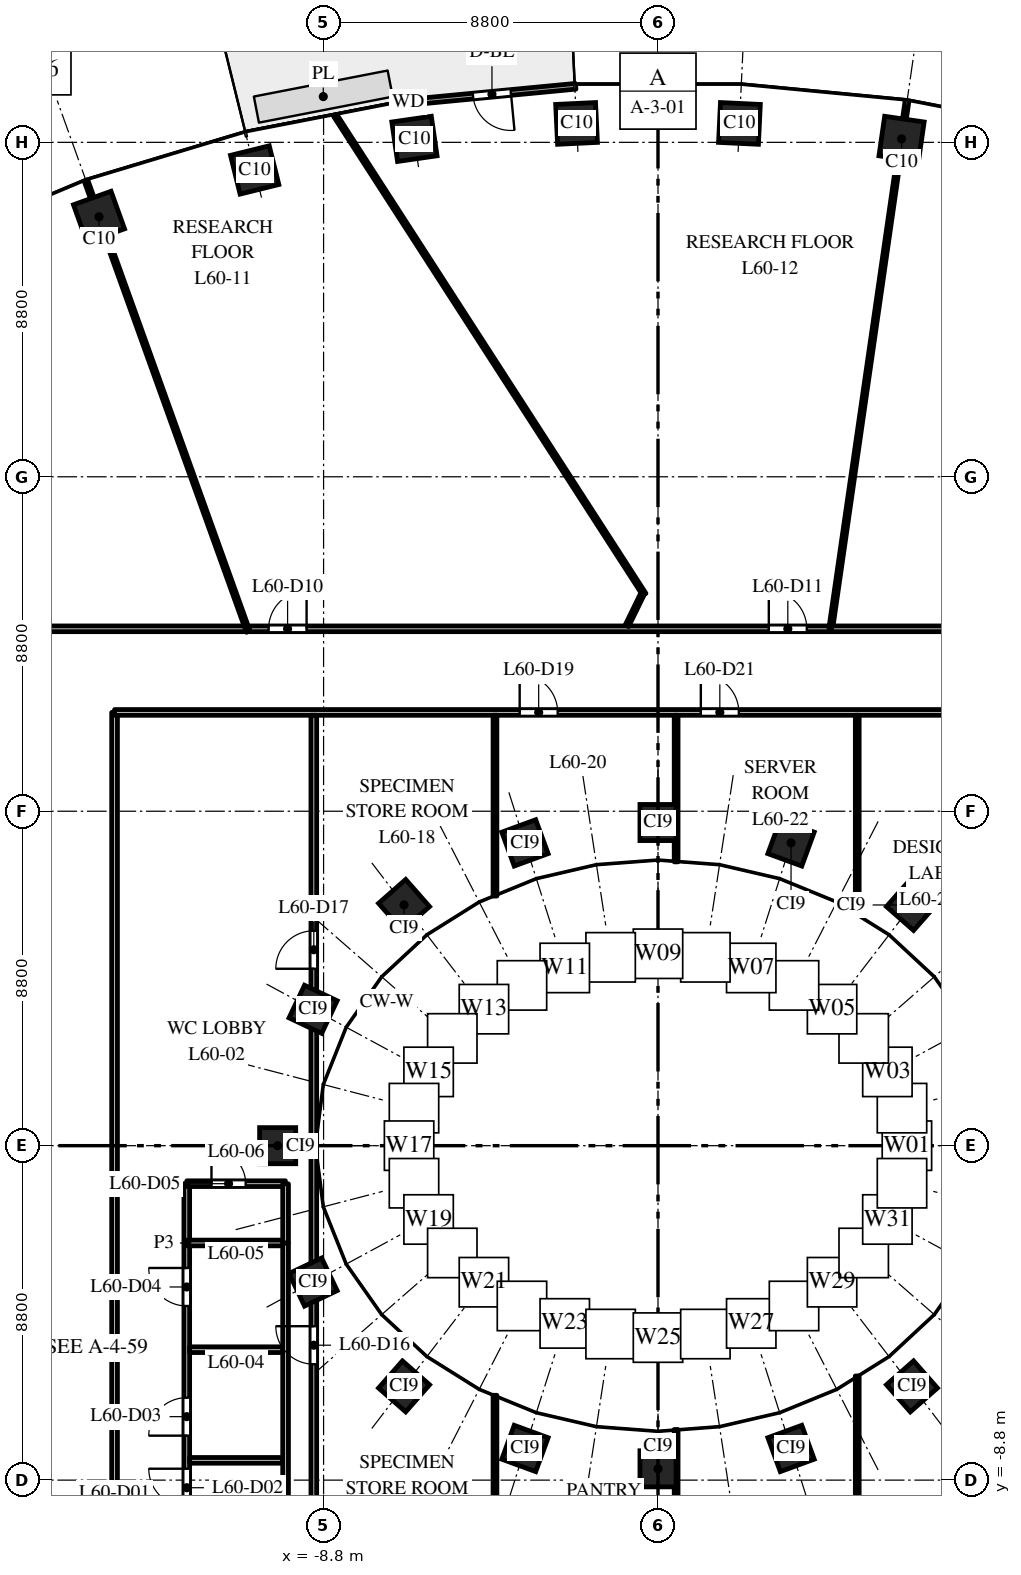
"""IFC4 building model, lengths in metres.
Left out: names, types, materials, properties, quantities, classifications, styles, units other than length and angle.
Written with IfcOpenShell. Run it as: python <this file> out.ifc"""

import sys

from ifc_helpers import new_model, si_unit, direction, frame, frame_2d, origin, origin_2d, place, context, subcontext, project, spatial, rectangle, extrude, element, fill, save


model = new_model("IFC4")
c1 = context("Model", 3, precision=1e-05, world=origin(), true_north=direction((0.0, 1.0)))
c2 = subcontext(c1, "Body", "Model", "MODEL_VIEW")
j1 = project(units=[si_unit("LENGTHUNIT", "METRE"), si_unit("PLANEANGLEUNIT", "RADIAN")], contexts=[c1])
p1 = place(None, origin())
s1 = spatial("IfcSite", under=j1, at=p1, CompositionType="ELEMENT")
p2 = place(p1, origin())
s2 = spatial("IfcBuilding", under=s1, at=p2, CompositionType="ELEMENT")
p3 = place(p2, frame((0.0, 0.0, 281.5)))
s3 = spatial("IfcBuildingStorey", under=s2, at=p3, CompositionType="ELEMENT", Elevation=281.5)
for number, where, z_axis, x_axis in (
    (1, (6.409, 26.491, 0.0), (0.0, 0.0, 1.0), (-0.99, 0.143, 0.0)),
    (2, (2.143, 26.898, 0.0), (0.0, 0.0, 1.0), (-0.999, 0.048, 0.0)),
    (3, (-2.143, 26.898, 0.0), (0.0, 0.0, 1.0), (-0.999, -0.048, 0.0)),
    (4, (-6.409, 26.491, 0.0), (0.0, 0.0, 1.0), (-0.99, -0.143, 0.0)),
    (5, (-10.613, 25.674, 0.0), (0.0, 0.0, 1.0), (-0.971, -0.24, 0.0)),
    (6, (-14.709, 24.441, 0.0), (0.0, 0.0, 1.0), (-0.941, -0.338, 0.0)),
):
    element("IfcColumn", number, at=place(p3, frame(where, z_axis=z_axis, x_axis=x_axis)), inside=s3, PredefinedType="COLUMN", context=c2, shape_type="SweptSolid", body=[
        extrude(rectangle(XDim=1.05, YDim=1.05, at=origin_2d()), origin(), (0.0, 0.0, 1.0), 4.0),
    ])
for number, where, z_axis, x_axis in (
    (7, (6.682, 6.334, 0.0), (0.0, 0.0, 1.0), (-0.751, 0.66, 0.0)),
    (8, (3.501, 7.967, 0.0), (0.0, 0.0, 1.0), (-0.939, 0.344, 0.0)),
    (9, (0.0, 8.503, 0.0), (0.0, 0.0, 1.0), (-1.0, 0.0, 0.0)),
    (10, (-3.501, 7.967, 0.0), (0.0, 0.0, 1.0), (-0.939, -0.344, 0.0)),
    (11, (-6.682, 6.334, 0.0), (0.0, 0.0, 1.0), (-0.751, -0.66, 0.0)),
    (12, (-9.076, 3.588, 0.0), (0.0, 0.0, 1.0), (-0.429, -0.903, 0.0)),
    (13, (-10.008, 0.0, 0.0), (0.0, 0.0, 1.0), (0.0, -1.0, 0.0)),
    (14, (-9.076, -3.588, 0.0), (0.0, 0.0, 1.0), (0.429, -0.903, 0.0)),
    (15, (-6.682, -6.334, 0.0), (0.0, 0.0, 1.0), (0.751, -0.66, 0.0)),
    (16, (-3.501, -7.967, 0.0), (0.0, 0.0, 1.0), (0.939, -0.344, 0.0)),
    (17, (0.0, -8.503, 0.0), (0.0, 0.0, 1.0), (1.0, 0.0, 0.0)),
    (18, (3.501, -7.967, 0.0), (0.0, 0.0, 1.0), (0.939, 0.344, 0.0)),
    (19, (6.682, -6.334, 0.0), (0.0, 0.0, 1.0), (0.751, 0.66, 0.0)),
):
    element("IfcColumn", number, at=place(p3, frame(where, z_axis=z_axis, x_axis=x_axis)), inside=s3, PredefinedType="COLUMN", context=c2, shape_type="SweptSolid", body=[
        extrude(rectangle(XDim=0.95, YDim=0.95, at=origin_2d()), origin(), (0.0, 0.0, 1.0), 4.0),
    ])
p4 = place(p3, frame((-2.166, 27.875, 0.0), z_axis=(0.0, 0.0, 1.0), x_axis=(-0.995473879823, -0.095035543824, 0.0)))
e20 = element("IfcWall", 20, at=p4, inside=s3, PredefinedType="STANDARD", context=c2, shape_type="SweptSolid", body=[
    extrude(rectangle(XDim=4.426, YDim=0.15, at=frame_2d((2.213, 0.0))), origin(), (0.0, 0.0, 1.0), 3.7),
])
p5 = place(p4, frame((1.713, 0.0, 0.0)))
e21 = element("IfcOpeningElement", 21, at=p5, cuts=e20, PredefinedType="OPENING", context=c2, shape_type="SweptSolid", body=[
    extrude(rectangle(XDim=1.0, YDim=2.4, at=frame_2d((0.5, 1.2))), frame((0.0, 0.085, 0.0), z_axis=(0.0, -1.0, 0.0), x_axis=(1.0, 0.0, 0.0)), (0.0, 0.0, 1.0), 0.17),
])
p6 = place(p3, frame((-24.0, 13.6, 0.0), z_axis=(0.0, 0.0, 1.0), x_axis=(1.0, 0.0, 0.0)))
e22 = element("IfcWall", 22, at=p6, inside=s3, PredefinedType="PARTITIONING", context=c2, shape_type="SweptSolid", body=[
    extrude(rectangle(XDim=13.177, YDim=0.15, at=frame_2d((6.588, 0.0))), origin(), (0.0, 0.0, 1.0), 2.75),
])
p7 = place(p6, frame((0.539, 0.0, 0.0)))
e23 = element("IfcOpeningElement", 23, at=p7, cuts=e22, PredefinedType="OPENING", context=c2, shape_type="SweptSolid", body=[
    extrude(rectangle(XDim=1.0, YDim=2.1, at=frame_2d((0.5, 1.05))), frame((0.0, 0.085, 0.0), z_axis=(0.0, -1.0, 0.0), x_axis=(1.0, 0.0, 0.0)), (0.0, 0.0, 1.0), 0.17),
])
p8 = place(p3, frame((-15.048, 25.383, 0.0), z_axis=(0.0, 0.0, 1.0), x_axis=(0.338383971485, -0.941008123154, 0.0)))
e24 = element("IfcWall", 24, at=p8, inside=s3, PredefinedType="PARTITIONING", context=c2, shape_type="SweptSolid", body=[
    extrude(rectangle(XDim=12.602, YDim=0.1, at=frame_2d((6.301, 0.0))), origin(), (0.0, 0.0, 1.0), 3.0),
])
p9 = place(p3, frame((-14.3, -11.4, 0.0), z_axis=(0.0, 0.0, 1.0), x_axis=(0.0, 1.0, 0.0)))
e25 = element("IfcWall", 25, at=p9, inside=s3, PredefinedType="PARTITIONING", context=c2, shape_type="SweptSolid", body=[
    extrude(rectangle(XDim=22.8, YDim=0.15, at=frame_2d((11.4, 0.0))), origin(), (0.0, 0.0, 1.0), 2.75),
])
p10 = place(p9, frame((0.65, 0.0, 0.0)))
e26 = element("IfcOpeningElement", 26, at=p10, cuts=e25, PredefinedType="OPENING", context=c2, shape_type="SweptSolid", body=[
    extrude(rectangle(XDim=1.0, YDim=2.1, at=frame_2d((0.5, 1.05))), frame((0.0, 0.085, 0.0), z_axis=(0.0, -1.0, 0.0), x_axis=(1.0, 0.0, 0.0)), (0.0, 0.0, 1.0), 0.17),
])
p11 = place(p3, frame((-14.3, 11.4, 0.0), z_axis=(0.0, 0.0, 1.0), x_axis=(1.0, 0.0, 0.0)))
e27 = element("IfcWall", 27, at=p11, inside=s3, PredefinedType="PARTITIONING", context=c2, shape_type="SweptSolid", body=[
    extrude(rectangle(XDim=28.6, YDim=0.15, at=frame_2d((14.3, 0.0))), origin(), (0.0, 0.0, 1.0), 2.85),
])
p12 = place(p11, frame((10.66, 0.0, 0.0)))
e28 = element("IfcOpeningElement", 28, at=p12, cuts=e27, PredefinedType="OPENING", context=c2, shape_type="SweptSolid", body=[
    extrude(rectangle(XDim=1.0, YDim=2.1, at=frame_2d((0.5, 1.05))), frame((0.0, 0.085, 0.0), z_axis=(0.0, -1.0, 0.0), x_axis=(1.0, 0.0, 0.0)), (0.0, 0.0, 1.0), 0.17),
])
p13 = place(p11, frame((15.427, 0.0, 0.0)))
e29 = element("IfcOpeningElement", 29, at=p13, cuts=e27, PredefinedType="OPENING", context=c2, shape_type="SweptSolid", body=[
    extrude(rectangle(XDim=1.0, YDim=2.1, at=frame_2d((0.5, 1.05))), frame((0.0, 0.085, 0.0), z_axis=(0.0, -1.0, 0.0), x_axis=(1.0, 0.0, 0.0)), (0.0, 0.0, 1.0), 0.17),
])
p14 = place(p11, frame((22.693, 0.0, 0.0)))
e30 = element("IfcOpeningElement", 30, at=p14, cuts=e27, PredefinedType="OPENING", context=c2, shape_type="SweptSolid", body=[
    extrude(rectangle(XDim=1.0, YDim=2.1, at=frame_2d((0.5, 1.05))), frame((0.0, 0.085, 0.0), z_axis=(0.0, -1.0, 0.0), x_axis=(1.0, 0.0, 0.0)), (0.0, 0.0, 1.0), 0.17),
])
p15 = place(p3, frame((-12.4, -11.325, 0.0), z_axis=(0.0, 0.0, 1.0), x_axis=(0.0, 1.0, 0.0)))
e31 = element("IfcWall", 31, at=p15, inside=s3, PredefinedType="PARTITIONING", context=c2, shape_type="SweptSolid", body=[
    extrude(rectangle(XDim=8.765, YDim=0.15, at=frame_2d((4.382, 0.0))), origin(), (0.0, 0.0, 1.0), 2.75),
])
p16 = place(p15, frame((1.825, 0.0, 0.0)))
e32 = element("IfcOpeningElement", 32, at=p16, cuts=e31, PredefinedType="OPENING", context=c2, shape_type="SweptSolid", body=[
    extrude(rectangle(XDim=1.0, YDim=2.1, at=frame_2d((0.5, 1.05))), frame((0.0, 0.085, 0.0), z_axis=(0.0, -1.0, 0.0), x_axis=(1.0, 0.0, 0.0)), (0.0, 0.0, 1.0), 0.17),
])
p17 = place(p15, frame((3.695, 0.0, 0.0)))
e33 = element("IfcOpeningElement", 33, at=p17, cuts=e31, PredefinedType="OPENING", context=c2, shape_type="SweptSolid", body=[
    extrude(rectangle(XDim=1.0, YDim=2.1, at=frame_2d((0.5, 1.05))), frame((0.0, 0.085, 0.0), z_axis=(0.0, -1.0, 0.0), x_axis=(1.0, 0.0, 0.0)), (0.0, 0.0, 1.0), 0.17),
])
p18 = place(p15, frame((7.107, 0.0, 0.0)))
e34 = element("IfcOpeningElement", 34, at=p18, cuts=e31, PredefinedType="OPENING", context=c2, shape_type="SweptSolid", body=[
    extrude(rectangle(XDim=1.0, YDim=2.1, at=frame_2d((0.5, 1.05))), frame((0.0, 0.085, 0.0), z_axis=(0.0, -1.0, 0.0), x_axis=(1.0, 0.0, 0.0)), (0.0, 0.0, 1.0), 0.17),
])
p19 = place(p3, frame((-12.325, -8.28, 0.0), z_axis=(0.0, 0.0, 1.0), x_axis=(1.0, 0.0, 0.0)))
e35 = element("IfcWall", 35, at=p19, inside=s3, PredefinedType="PARTITIONING", context=c2, shape_type="SweptSolid", body=[
    extrude(rectangle(XDim=2.45, YDim=0.15, at=frame_2d((1.225, 0.0))), origin(), (0.0, 0.0, 1.0), 2.75),
])
p20 = place(p3, frame((-12.325, -5.368, 0.0), z_axis=(0.0, 0.0, 1.0), x_axis=(1.0, 0.0, 0.0)))
e36 = element("IfcWall", 36, at=p20, inside=s3, PredefinedType="PARTITIONING", context=c2, shape_type="SweptSolid", body=[
    extrude(rectangle(XDim=2.45, YDim=0.15, at=frame_2d((1.225, 0.0))), origin(), (0.0, 0.0, 1.0), 3.7),
])
p21 = place(p3, frame((-12.4, -2.56, 0.0), z_axis=(0.0, 0.0, 1.0), x_axis=(0.0, 1.0, 0.0)))
e37 = element("IfcWall", 37, at=p21, inside=s3, PredefinedType="PARTITIONING", context=c2, shape_type="SweptSolid", body=[
    extrude(rectangle(XDim=1.56, YDim=0.15, at=frame_2d((0.78, 0.0))), origin(), (0.0, 0.0, 1.0), 3.7),
])
p22 = place(p3, frame((-12.4, -2.56, 0.0), z_axis=(0.0, 0.0, 1.0), x_axis=(1.0, 0.0, 0.0)))
e38 = element("IfcWall", 38, at=p22, inside=s3, PredefinedType="PARTITIONING", context=c2, shape_type="SweptSolid", body=[
    extrude(rectangle(XDim=2.6, YDim=0.15, at=frame_2d((1.3, 0.0))), origin(), (0.0, 0.0, 1.0), 3.7),
])
p23 = place(p3, frame((-12.4, -1.0, 0.0), z_axis=(0.0, 0.0, 1.0), x_axis=(1.0, 0.0, 0.0)))
e39 = element("IfcWall", 39, at=p23, inside=s3, PredefinedType="PARTITIONING", context=c2, shape_type="SweptSolid", body=[
    extrude(rectangle(XDim=2.596, YDim=0.15, at=frame_2d((1.298, 0.0))), origin(), (0.0, 0.0, 1.0), 3.7),
])
p24 = place(p23, frame((0.65, 0.0, 0.0)))
e40 = element("IfcOpeningElement", 40, at=p24, cuts=e39, PredefinedType="OPENING", context=c2, shape_type="SweptSolid", body=[
    extrude(rectangle(XDim=0.9, YDim=2.1, at=frame_2d((0.45, 1.05))), frame((0.0, 0.085, 0.0), z_axis=(0.0, -1.0, 0.0), x_axis=(1.0, 0.0, 0.0)), (0.0, 0.0, 1.0), 0.17),
])
p25 = place(p3, frame((-10.758, 13.6, 0.0), z_axis=(0.0, 0.0, 1.0), x_axis=(1.0, 0.0, 0.0)))
e41 = element("IfcWall", 41, at=p25, inside=s3, PredefinedType="PARTITIONING", context=c2, shape_type="SweptSolid", body=[
    extrude(rectangle(XDim=15.304, YDim=0.15, at=frame_2d((7.652, 0.0))), origin(), (0.0, 0.0, 1.0), 2.85),
])
p26 = place(p25, frame((0.511, 0.0, 0.0)))
e42 = element("IfcOpeningElement", 42, at=p26, cuts=e41, PredefinedType="OPENING", context=c2, shape_type="SweptSolid", body=[
    extrude(rectangle(XDim=1.0, YDim=2.1, at=frame_2d((0.5, 1.05))), frame((0.0, 0.085, 0.0), z_axis=(0.0, -1.0, 0.0), x_axis=(1.0, 0.0, 0.0)), (0.0, 0.0, 1.0), 0.17),
])
p27 = place(p25, frame((13.674, 0.0, 0.0)))
e43 = element("IfcOpeningElement", 43, at=p27, cuts=e41, PredefinedType="OPENING", context=c2, shape_type="SweptSolid", body=[
    extrude(rectangle(XDim=1.0, YDim=2.1, at=frame_2d((0.5, 1.05))), frame((0.0, 0.085, 0.0), z_axis=(0.0, -1.0, 0.0), x_axis=(1.0, 0.0, 0.0)), (0.0, 0.0, 1.0), 0.17),
])
p28 = place(p3, frame((-9.8, -11.325, 0.0), z_axis=(0.0, 0.0, 1.0), x_axis=(0.0, 1.0, 0.0)))
e44 = element("IfcWall", 44, at=p28, inside=s3, PredefinedType="PARTITIONING", context=c2, shape_type="SweptSolid", body=[
    extrude(rectangle(XDim=8.765, YDim=0.15, at=frame_2d((4.382, 0.0))), origin(), (0.0, 0.0, 1.0), 2.75),
])
p29 = place(p3, frame((-9.8, -2.56, 0.0), z_axis=(0.0, 0.0, 1.0), x_axis=(0.0, 1.0, 0.0)))
e45 = element("IfcWall", 45, at=p29, inside=s3, PredefinedType="PARTITIONING", context=c2, shape_type="SweptSolid", body=[
    extrude(rectangle(XDim=1.556, YDim=0.15, at=frame_2d((0.778, 0.0))), origin(), (0.0, 0.0, 1.0), 3.7),
])
p30 = place(p3, frame((-9.057, -11.325, 0.0), z_axis=(0.0, 0.0, 1.0), x_axis=(0.0, 1.0, 0.0)))
e46 = element("IfcWall", 46, at=p30, inside=s3, PredefinedType="PARTITIONING", context=c2, shape_type="SweptSolid", body=[
    extrude(rectangle(XDim=11.28, YDim=0.15, at=frame_2d((5.64, 0.0))), origin(), (0.0, 0.0, 1.0), 2.75),
])
p31 = place(p30, frame((5.575, 0.0, 0.0)))
e47 = element("IfcOpeningElement", 47, at=p31, cuts=e46, PredefinedType="OPENING", context=c2, shape_type="SweptSolid", body=[
    extrude(rectangle(XDim=1.0, YDim=2.1, at=frame_2d((0.5, 1.05))), frame((0.0, 0.085, 0.0), z_axis=(0.0, -1.0, 0.0), x_axis=(1.0, 0.0, 0.0)), (0.0, 0.0, 1.0), 0.17),
])
p32 = place(p3, frame((-9.057, 0.045, 0.0), z_axis=(0.0, 0.0, 1.0), x_axis=(0.0, 1.0, 0.0)))
e48 = element("IfcWall", 48, at=p32, inside=s3, PredefinedType="PARTITIONING", context=c2, shape_type="SweptSolid", body=[
    extrude(rectangle(XDim=11.28, YDim=0.15, at=frame_2d((5.64, 0.0))), origin(), (0.0, 0.0, 1.0), 2.75),
])
p33 = place(p32, frame((4.61, 0.0, 0.0)))
e49 = element("IfcOpeningElement", 49, at=p33, cuts=e48, PredefinedType="OPENING", context=c2, shape_type="SweptSolid", body=[
    extrude(rectangle(XDim=1.0, YDim=2.1, at=frame_2d((0.5, 1.05))), frame((0.0, 0.085, 0.0), z_axis=(0.0, -1.0, 0.0), x_axis=(1.0, 0.0, 0.0)), (0.0, 0.0, 1.0), 0.17),
])
p34 = place(p3, frame((-8.491, 27.104, 0.0), z_axis=(0.0, 0.0, 1.0), x_axis=(0.542267400535, -0.840205966604, 0.0)))
e50 = element("IfcWall", 50, at=p34, inside=s3, PredefinedType="PARTITIONING", context=c2, shape_type="SweptSolid", body=[
    extrude(rectangle(XDim=14.996, YDim=0.1, at=frame_2d((7.498, 0.0))), origin(), (0.0, 0.0, 1.0), 2.85),
])
for number, where, z_axis, x_axis in (
    (51, (-4.29, -11.325, 0.0), (0.0, 0.0, 1.0), (0.0, 1.0, 0.0)),
    (52, (-4.29, 6.568, 0.0), (0.0, 0.0, 1.0), (0.0, 1.0, 0.0)),
):
    element("IfcWall", number, at=place(p3, frame(where, z_axis=z_axis, x_axis=x_axis)), inside=s3, PredefinedType="PARTITIONING", context=c2, shape_type="SweptSolid", body=[
        extrude(rectangle(XDim=4.757, YDim=0.1, at=frame_2d((2.378, 0.0))), origin(), (0.0, 0.0, 1.0), 2.85),
    ])
p35 = place(p3, frame((-0.818, 13.679, 0.0), z_axis=(0.0, 0.0, 1.0), x_axis=(0.438544580815, 0.898709436157, 0.0)))
e53 = element("IfcWall", 53, at=p35, inside=s3, PredefinedType="PARTITIONING", context=c2, shape_type="SweptSolid", body=[
    extrude(rectangle(XDim=0.915, YDim=0.1, at=frame_2d((0.457, 0.0))), origin(), (0.0, 0.0, 1.0), 3.7),
])
for number, where, z_axis, x_axis in (
    (54, (0.477, -11.325, 0.0), (0.0, 0.0, 1.0), (0.0, 1.0, 0.0)),
    (55, (0.477, 7.468, 0.0), (0.0, 0.0, 1.0), (0.0, 1.0, 0.0)),
):
    element("IfcWall", number, at=place(p3, frame(where, z_axis=z_axis, x_axis=x_axis)), inside=s3, PredefinedType="PARTITIONING", context=c2, shape_type="SweptSolid", body=[
        extrude(rectangle(XDim=3.857, YDim=0.1, at=frame_2d((1.928, 0.0))), origin(), (0.0, 0.0, 1.0), 3.0),
    ])
p36 = place(p3, frame((4.546, 13.604, 0.0), z_axis=(0.0, 0.0, 1.0), x_axis=(0.143076365974, 0.989711651694, 0.0)))
e56 = element("IfcWall", 56, at=p36, inside=s3, PredefinedType="PARTITIONING", context=c2, shape_type="SweptSolid", body=[
    extrude(rectangle(XDim=14.021, YDim=0.1, at=frame_2d((7.011, 0.0))), origin(), (0.0, 0.0, 1.0), 2.85),
])
p37 = place(p3, frame((4.566, 13.6, 0.0), z_axis=(0.0, 0.0, 1.0), x_axis=(1.0, 0.0, 0.0)))
e57 = element("IfcWall", 57, at=p37, inside=s3, PredefinedType="PARTITIONING", context=c2, shape_type="SweptSolid", body=[
    extrude(rectangle(XDim=19.434, YDim=0.15, at=frame_2d((9.717, 0.0))), origin(), (0.0, 0.0, 1.0), 2.85),
])
p38 = place(p37, frame((15.692, 0.0, 0.0)))
e58 = element("IfcOpeningElement", 58, at=p38, cuts=e57, PredefinedType="OPENING", context=c2, shape_type="SweptSolid", body=[
    extrude(rectangle(XDim=1.0, YDim=2.1, at=frame_2d((0.5, 1.05))), frame((0.0, 0.085, 0.0), z_axis=(0.0, -1.0, 0.0), x_axis=(1.0, 0.0, 0.0)), (0.0, 0.0, 1.0), 0.17),
])
for number, where, z_axis, x_axis in (
    (59, (5.243, -11.325, 0.0), (0.0, 0.0, 1.0), (0.0, 1.0, 0.0)),
    (60, (5.243, 6.059, 0.0), (0.0, 0.0, 1.0), (0.0, 1.0, 0.0)),
):
    element("IfcWall", number, at=place(p3, frame(where, z_axis=z_axis, x_axis=x_axis)), inside=s3, PredefinedType="PARTITIONING", context=c2, shape_type="SweptSolid", body=[
        extrude(rectangle(XDim=5.266, YDim=0.1, at=frame_2d((2.633, 0.0))), origin(), (0.0, 0.0, 1.0), 2.85),
    ])
p39 = place(p5, origin())
e61 = element("IfcDoor", 61, at=p39, inside=s3, OperationType="SINGLE_SWING_LEFT", PredefinedType="DOOR", context=c2, shape_type="SweptSolid", body=[
    extrude(rectangle(XDim=1.0, YDim=2.4, at=frame_2d((0.5, 1.2))), frame((0.0, 0.025, 0.0), z_axis=(0.0, -1.0, 0.0), x_axis=(1.0, 0.0, 0.0)), (0.0, 0.0, 1.0), 0.05),
])
fill(e21, e61)
p40 = place(p16, origin())
e62 = element("IfcDoor", 62, at=p40, inside=s3, OperationType="SINGLE_SWING_RIGHT", PredefinedType="DOOR", context=c2, shape_type="SweptSolid", body=[
    extrude(rectangle(XDim=1.0, YDim=2.1, at=frame_2d((0.5, 1.05))), frame((0.0, 0.025, 0.0), z_axis=(0.0, -1.0, 0.0), x_axis=(1.0, 0.0, 0.0)), (0.0, 0.0, 1.0), 0.05),
])
fill(e32, e62)
p41 = place(p17, origin())
e63 = element("IfcDoor", 63, at=p41, inside=s3, OperationType="SINGLE_SWING_LEFT", PredefinedType="DOOR", context=c2, shape_type="SweptSolid", body=[
    extrude(rectangle(XDim=1.0, YDim=2.1, at=frame_2d((0.5, 1.05))), frame((0.0, 0.025, 0.0), z_axis=(0.0, -1.0, 0.0), x_axis=(1.0, 0.0, 0.0)), (0.0, 0.0, 1.0), 0.05),
])
fill(e33, e63)
p42 = place(p18, origin())
e64 = element("IfcDoor", 64, at=p42, inside=s3, OperationType="SINGLE_SWING_RIGHT", PredefinedType="DOOR", context=c2, shape_type="SweptSolid", body=[
    extrude(rectangle(XDim=1.0, YDim=2.1, at=frame_2d((0.5, 1.05))), frame((0.0, 0.025, 0.0), z_axis=(0.0, -1.0, 0.0), x_axis=(1.0, 0.0, 0.0)), (0.0, 0.0, 1.0), 0.05),
])
fill(e34, e64)
p43 = place(p24, origin())
e65 = element("IfcDoor", 65, at=p43, inside=s3, OperationType="SINGLE_SWING_LEFT", PredefinedType="DOOR", context=c2, shape_type="SweptSolid", body=[
    extrude(rectangle(XDim=0.9, YDim=2.1, at=frame_2d((0.45, 1.05))), frame((0.0, 0.025, 0.0), z_axis=(0.0, -1.0, 0.0), x_axis=(1.0, 0.0, 0.0)), (0.0, 0.0, 1.0), 0.05),
])
fill(e40, e65)
p44 = place(p26, origin())
e66 = element("IfcDoor", 66, at=p44, inside=s3, OperationType="SINGLE_SWING_RIGHT", PredefinedType="DOOR", context=c2, shape_type="SweptSolid", body=[
    extrude(rectangle(XDim=1.0, YDim=2.1, at=frame_2d((0.5, 1.05))), frame((0.0, 0.025, 0.0), z_axis=(0.0, -1.0, 0.0), x_axis=(1.0, 0.0, 0.0)), (0.0, 0.0, 1.0), 0.05),
])
fill(e42, e66)
p45 = place(p27, origin())
e67 = element("IfcDoor", 67, at=p45, inside=s3, OperationType="SINGLE_SWING_LEFT", PredefinedType="DOOR", context=c2, shape_type="SweptSolid", body=[
    extrude(rectangle(XDim=1.0, YDim=2.1, at=frame_2d((0.5, 1.05))), frame((0.0, 0.025, 0.0), z_axis=(0.0, -1.0, 0.0), x_axis=(1.0, 0.0, 0.0)), (0.0, 0.0, 1.0), 0.05),
])
fill(e43, e67)
p46 = place(p31, origin())
e68 = element("IfcDoor", 68, at=p46, inside=s3, OperationType="SINGLE_SWING_RIGHT", PredefinedType="DOOR", context=c2, shape_type="SweptSolid", body=[
    extrude(rectangle(XDim=1.0, YDim=2.1, at=frame_2d((0.5, 1.05))), frame((0.0, 0.025, 0.0), z_axis=(0.0, -1.0, 0.0), x_axis=(1.0, 0.0, 0.0)), (0.0, 0.0, 1.0), 0.05),
])
fill(e47, e68)
p47 = place(p33, origin())
e69 = element("IfcDoor", 69, at=p47, inside=s3, OperationType="SINGLE_SWING_LEFT", PredefinedType="DOOR", context=c2, shape_type="SweptSolid", body=[
    extrude(rectangle(XDim=1.0, YDim=2.1, at=frame_2d((0.5, 1.05))), frame((0.0, 0.025, 0.0), z_axis=(0.0, -1.0, 0.0), x_axis=(1.0, 0.0, 0.0)), (0.0, 0.0, 1.0), 0.05),
])
fill(e49, e69)
p48 = place(p12, origin())
e70 = element("IfcDoor", 70, at=p48, inside=s3, OperationType="SINGLE_SWING_LEFT", PredefinedType="DOOR", context=c2, shape_type="SweptSolid", body=[
    extrude(rectangle(XDim=1.0, YDim=2.1, at=frame_2d((0.5, 1.05))), frame((0.0, 0.025, 0.0), z_axis=(0.0, -1.0, 0.0), x_axis=(1.0, 0.0, 0.0)), (0.0, 0.0, 1.0), 0.05),
])
fill(e28, e70)
p49 = place(p13, origin())
e71 = element("IfcDoor", 71, at=p49, inside=s3, OperationType="SINGLE_SWING_LEFT", PredefinedType="DOOR", context=c2, shape_type="SweptSolid", body=[
    extrude(rectangle(XDim=1.0, YDim=2.1, at=frame_2d((0.5, 1.05))), frame((0.0, 0.025, 0.0), z_axis=(0.0, -1.0, 0.0), x_axis=(1.0, 0.0, 0.0)), (0.0, 0.0, 1.0), 0.05),
])
fill(e29, e71)
save(model, sys.argv[1])
